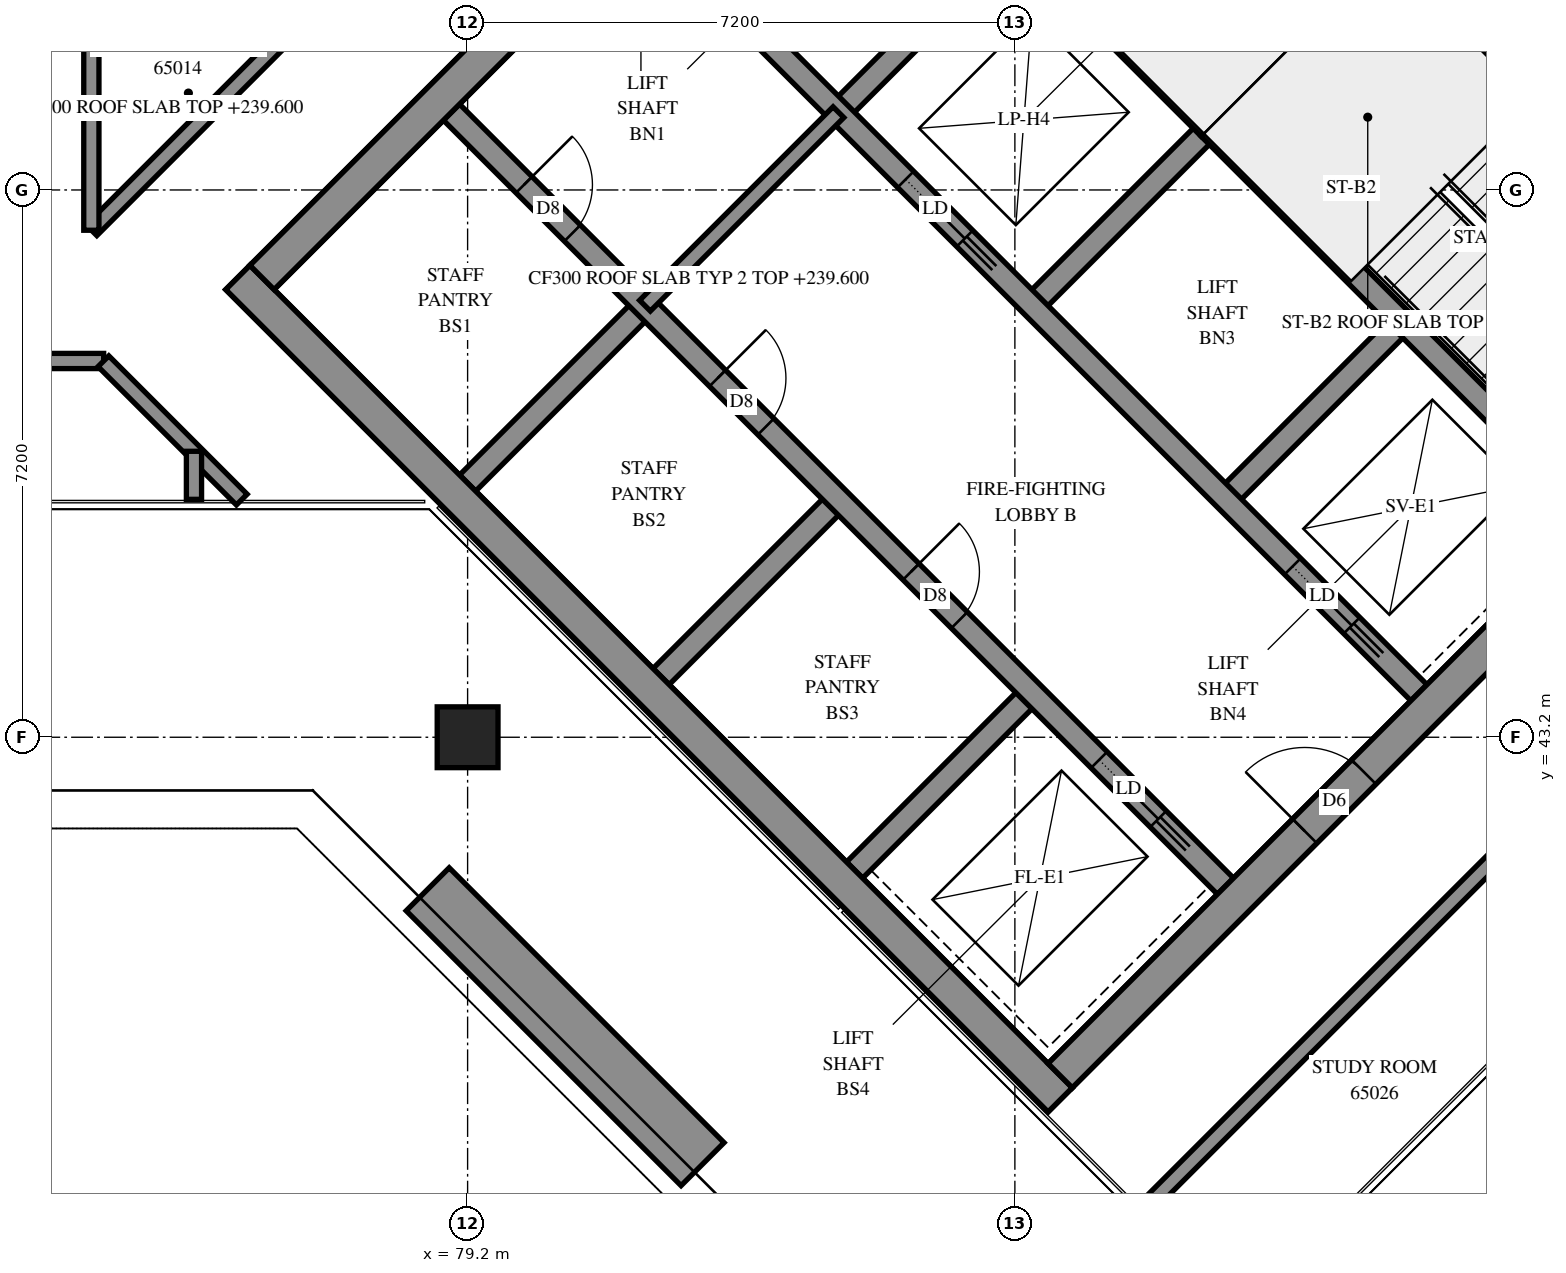
"""IFC4 building model, lengths in metres.
Left out: names, types, materials, properties, quantities, classifications, styles, units other than length and angle.
Written with IfcOpenShell. Run it as: python <this file> out.ifc"""

import sys

from ifc_helpers import new_model, si_unit, direction, frame, frame_2d, origin, origin_2d, place, context, subcontext, project, spatial, rectangle, extrude, element, fill, save


model = new_model("IFC4")
c1 = context("Model", 3, precision=1e-05, world=origin(), true_north=direction((0.0, 1.0)))
c2 = subcontext(c1, "Body", "Model", "MODEL_VIEW")
j1 = project(units=[si_unit("LENGTHUNIT", "METRE"), si_unit("PLANEANGLEUNIT", "RADIAN")], contexts=[c1])
p1 = place(None, origin())
s1 = spatial("IfcSite", under=j1, at=p1, CompositionType="ELEMENT")
p2 = place(p1, origin())
s2 = spatial("IfcBuilding", under=s1, at=p2, CompositionType="ELEMENT")
p3 = place(p2, frame((0.0, 0.0, 239.6)))
s3 = spatial("IfcBuildingStorey", under=s2, at=p3, CompositionType="ELEMENT", Elevation=239.6)
p4 = place(p3, frame((79.2, 43.2, 0.0), z_axis=(0.0, 0.0, 1.0), x_axis=(1.0, 0.0, 0.0)))
e1 = element("IfcColumn", 1, at=p4, inside=s3, PredefinedType="COLUMN", context=c2, shape_type="SweptSolid", body=[
    extrude(rectangle(XDim=0.8, YDim=0.8, at=origin_2d()), origin(), (0.0, 0.0, 1.0), 3.9),
])
p5 = place(p3, frame((76.177, 49.249, -0.3), z_axis=(0.0, 0.0, 1.0), x_axis=(0.7071100491, -0.7071035132, 0.0)))
e2 = element("IfcWall", 2, at=p5, inside=s3, PredefinedType="SHEAR", context=c2, shape_type="SweptSolid", body=[
    extrude(rectangle(XDim=15.3, YDim=0.45, at=frame_2d((7.65, 0.0))), origin(), (0.0, 0.0, 1.0), 3.5),
])
p6 = place(p3, frame((86.678, 59.749, -0.3), z_axis=(0.0, 0.0, 1.0), x_axis=(0.7071035132, -0.7071100491, 0.0)))
e3 = element("IfcWall", 3, at=p6, inside=s3, PredefinedType="SHEAR", context=c2, shape_type="SweptSolid", body=[
    extrude(rectangle(XDim=15.3, YDim=0.45, at=frame_2d((7.65, 0.0))), origin(), (0.0, 0.0, 1.0), 3.5),
])
p7 = place(p6, frame((10.45, 0.0, 0.3)))
e4 = element("IfcOpeningElement", 4, at=p7, cuts=e3, PredefinedType="OPENING", context=c2, shape_type="SweptSolid", body=[
    extrude(rectangle(XDim=0.8, YDim=2.1, at=frame_2d((0.4, 1.05))), frame((0.0, 0.235, 0.0), z_axis=(0.0, -1.0, 0.0), x_axis=(1.0, 0.0, 0.0)), (0.0, 0.0, 1.0), 0.47),
])
p8 = place(p3, frame((76.495, 49.249, -0.3), z_axis=(0.0, 0.0, 1.0), x_axis=(0.7071067812, 0.7071067812, 0.0)))
e5 = element("IfcWall", 5, at=p8, inside=s3, PredefinedType="SHEAR", context=c2, shape_type="SweptSolid", body=[
    extrude(rectangle(XDim=14.4, YDim=0.45, at=frame_2d((7.2, 0.0))), origin(), (0.0, 0.0, 1.0), 3.5),
])
p9 = place(p8, frame((4.55, 0.0, 0.3)))
e6 = element("IfcOpeningElement", 6, at=p9, cuts=e5, PredefinedType="OPENING", context=c2, shape_type="SweptSolid", body=[
    extrude(rectangle(XDim=1.1, YDim=2.1, at=frame_2d((0.55, 1.05))), frame((0.0, 0.235, 0.0), z_axis=(0.0, -1.0, 0.0), x_axis=(1.0, 0.0, 0.0)), (0.0, 0.0, 1.0), 0.47),
])
p10 = place(p8, frame((11.35, 0.0, 0.3)))
e7 = element("IfcOpeningElement", 7, at=p10, cuts=e5, PredefinedType="OPENING", context=c2, shape_type="SweptSolid", body=[
    extrude(rectangle(XDim=1.1, YDim=2.1, at=frame_2d((0.55, 1.05))), frame((0.0, 0.235, 0.0), z_axis=(0.0, -1.0, 0.0), x_axis=(1.0, 0.0, 0.0)), (0.0, 0.0, 1.0), 0.47),
])
p11 = place(p3, frame((86.996, 38.748, -0.3), z_axis=(0.0, 0.0, 1.0), x_axis=(0.7071067812, 0.7071067812, 0.0)))
e8 = element("IfcWall", 8, at=p11, inside=s3, PredefinedType="SHEAR", context=c2, shape_type="SweptSolid", body=[
    extrude(rectangle(XDim=14.4, YDim=0.45, at=frame_2d((7.2, 0.0))), origin(), (0.0, 0.0, 1.0), 3.5),
])
p12 = place(p11, frame((4.55, 0.0, 0.3)))
e9 = element("IfcOpeningElement", 9, at=p12, cuts=e8, PredefinedType="OPENING", context=c2, shape_type="SweptSolid", body=[
    extrude(rectangle(XDim=1.1, YDim=2.1, at=frame_2d((0.55, 1.05))), frame((0.0, 0.235, 0.0), z_axis=(0.0, -1.0, 0.0), x_axis=(1.0, 0.0, 0.0)), (0.0, 0.0, 1.0), 0.47),
])
p13 = place(p11, frame((11.35, 0.0, 0.3)))
e10 = element("IfcOpeningElement", 10, at=p13, cuts=e8, PredefinedType="OPENING", context=c2, shape_type="SweptSolid", body=[
    extrude(rectangle(XDim=1.1, YDim=2.1, at=frame_2d((0.55, 1.05))), frame((0.0, 0.235, 0.0), z_axis=(0.0, -1.0, 0.0), x_axis=(1.0, 0.0, 0.0)), (0.0, 0.0, 1.0), 0.47),
])
for number, where, z_axis, x_axis in (
    (11, (79.2, 46.544, 0.0), (0.0, 0.0, 1.0), (0.707, 0.707, 0.0)),
    (12, (84.079, 51.423, 0.0), (0.0, 0.0, 1.0), (0.707, 0.707, 0.0)),
):
    element("IfcWall", number, at=place(p3, frame(where, z_axis=z_axis, x_axis=x_axis)), inside=s3, PredefinedType="SOLIDWALL", context=c2, shape_type="SweptSolid", body=[
        extrude(rectangle(XDim=3.3, YDim=0.3, at=frame_2d((1.65, 0.0))), origin(), (0.0, 0.0, 1.0), 3.9),
    ])
p14 = place(p3, frame((81.746, 43.999, 0.0), z_axis=(0.0, 0.0, 1.0), x_axis=(0.7071067812, 0.7071067812, 0.0)))
e13 = element("IfcWall", 13, at=p14, inside=s3, PredefinedType="SOLIDWALL", context=c2, shape_type="SweptSolid", body=[
    extrude(rectangle(XDim=3.3, YDim=0.3, at=frame_2d((1.65, 0.0))), origin(), (0.0, 0.0, 1.0), 3.9),
])
p15 = place(p3, frame((86.625, 48.878, 0.0), z_axis=(0.0, 0.0, 1.0), x_axis=(0.7071067812, 0.7071067812, 0.0)))
e14 = element("IfcWall", 14, at=p15, inside=s3, PredefinedType="SOLIDWALL", context=c2, shape_type="SweptSolid", body=[
    extrude(rectangle(XDim=3.3, YDim=0.3, at=frame_2d((1.65, 0.0))), origin(), (0.0, 0.0, 1.0), 3.9),
])
p16 = place(p3, frame((84.291, 41.453, 0.0), z_axis=(0.0, 0.0, 1.0), x_axis=(0.7071067812, 0.7071067812, 0.0)))
e15 = element("IfcWall", 15, at=p16, inside=s3, PredefinedType="SOLIDWALL", context=c2, shape_type="SweptSolid", body=[
    extrude(rectangle(XDim=3.3, YDim=0.3, at=frame_2d((1.65, 0.0))), origin(), (0.0, 0.0, 1.0), 3.9),
])
p17 = place(p3, frame((89.17, 46.332, 0.0), z_axis=(0.0, 0.0, 1.0), x_axis=(0.7071067812, 0.7071067812, 0.0)))
e16 = element("IfcWall", 16, at=p17, inside=s3, PredefinedType="SOLIDWALL", context=c2, shape_type="SweptSolid", body=[
    extrude(rectangle(XDim=3.3, YDim=0.3, at=frame_2d((1.65, 0.0))), origin(), (0.0, 0.0, 1.0), 3.9),
])
p18 = place(p3, frame((78.988, 51.423, 0.0), z_axis=(0.0, 0.0, 1.0), x_axis=(0.7071067812, -0.7071067812, 0.0)))
e17 = element("IfcWall", 17, at=p18, inside=s3, PredefinedType="SOLIDWALL", context=c2, shape_type="SweptSolid", body=[
    extrude(rectangle(XDim=14.4, YDim=0.3, at=frame_2d((7.2, 0.0))), origin(), (0.0, 0.0, 1.0), 3.9),
])
p19 = place(p18, frame((1.35, 0.0, 0.0)))
e18 = element("IfcOpeningElement", 18, at=p19, cuts=e17, PredefinedType="OPENING", context=c2, shape_type="SweptSolid", body=[
    extrude(rectangle(XDim=0.9, YDim=2.1, at=frame_2d((0.45, 1.05))), frame((0.0, 0.16, 0.0), z_axis=(0.0, -1.0, 0.0), x_axis=(1.0, 0.0, 0.0)), (0.0, 0.0, 1.0), 0.32),
])
p20 = place(p18, frame((4.95, 0.0, 0.0)))
e19 = element("IfcOpeningElement", 19, at=p20, cuts=e17, PredefinedType="OPENING", context=c2, shape_type="SweptSolid", body=[
    extrude(rectangle(XDim=0.9, YDim=2.1, at=frame_2d((0.45, 1.05))), frame((0.0, 0.16, 0.0), z_axis=(0.0, -1.0, 0.0), x_axis=(1.0, 0.0, 0.0)), (0.0, 0.0, 1.0), 0.32),
])
p21 = place(p18, frame((8.55, 0.0, 0.0)))
e20 = element("IfcOpeningElement", 20, at=p21, cuts=e17, PredefinedType="OPENING", context=c2, shape_type="SweptSolid", body=[
    extrude(rectangle(XDim=0.9, YDim=2.1, at=frame_2d((0.45, 1.05))), frame((0.0, 0.16, 0.0), z_axis=(0.0, -1.0, 0.0), x_axis=(1.0, 0.0, 0.0)), (0.0, 0.0, 1.0), 0.32),
])
p22 = place(p18, frame((12.05, 0.0, 0.0)))
e21 = element("IfcOpeningElement", 21, at=p22, cuts=e17, PredefinedType="OPENING", context=c2, shape_type="SweptSolid", body=[
    extrude(rectangle(XDim=1.1, YDim=2.1, at=frame_2d((0.55, 1.05))), frame((0.0, 0.16, 0.0), z_axis=(0.0, -1.0, 0.0), x_axis=(1.0, 0.0, 0.0)), (0.0, 0.0, 1.0), 0.32),
])
p23 = place(p3, frame((81.534, 53.969, 0.0), z_axis=(0.0, 0.0, 1.0), x_axis=(0.707103309, -0.7071102534, 0.0)))
e22 = element("IfcWall", 22, at=p23, inside=s3, PredefinedType="SOLIDWALL", context=c2, shape_type="SweptSolid", body=[
    extrude(rectangle(XDim=14.4, YDim=0.3, at=frame_2d((7.2, 0.0))), origin(), (0.0, 0.0, 1.0), 3.9),
])
p24 = place(p23, frame((1.25, 0.0, 0.0)))
e23 = element("IfcOpeningElement", 23, at=p24, cuts=e22, PredefinedType="OPENING", context=c2, shape_type="SweptSolid", body=[
    extrude(rectangle(XDim=1.1, YDim=2.1, at=frame_2d((0.55, 1.05))), frame((0.0, 0.16, 0.0), z_axis=(0.0, -1.0, 0.0), x_axis=(1.0, 0.0, 0.0)), (0.0, 0.0, 1.0), 0.32),
])
p25 = place(p23, frame((4.85, 0.0, 0.0)))
e24 = element("IfcOpeningElement", 24, at=p25, cuts=e22, PredefinedType="OPENING", context=c2, shape_type="SweptSolid", body=[
    extrude(rectangle(XDim=1.1, YDim=2.1, at=frame_2d((0.55, 1.05))), frame((0.0, 0.16, 0.0), z_axis=(0.0, -1.0, 0.0), x_axis=(1.0, 0.0, 0.0)), (0.0, 0.0, 1.0), 0.32),
])
p26 = place(p23, frame((12.05, 0.0, 0.0)))
e25 = element("IfcOpeningElement", 25, at=p26, cuts=e22, PredefinedType="OPENING", context=c2, shape_type="SweptSolid", body=[
    extrude(rectangle(XDim=1.1, YDim=2.1, at=frame_2d((0.55, 1.05))), frame((0.0, 0.16, 0.0), z_axis=(0.0, -1.0, 0.0), x_axis=(1.0, 0.0, 0.0)), (0.0, 0.0, 1.0), 0.32),
])
for number, where, z_axis, x_axis in (
    (26, (83.867, 56.302, 0.0), (0.0, 0.0, 1.0), (0.707, -0.707, 0.0)),
    (27, (88.958, 51.211, 0.0), (0.0, 0.0, 1.0), (0.707, -0.707, 0.0)),
):
    element("IfcWall", number, at=place(p3, frame(where, z_axis=z_axis, x_axis=x_axis)), inside=s3, PredefinedType="SOLIDWALL", context=c2, shape_type="SweptSolid", body=[
        extrude(rectangle(XDim=7.2, YDim=0.3, at=frame_2d((3.6, 0.0))), origin(), (0.0, 0.0, 1.0), 3.9),
    ])
p27 = place(p3, frame((88.958, 51.211, 0.0), z_axis=(0.0, 0.0, 1.0), x_axis=(0.7071067812, 0.7071067812, 0.0)))
e28 = element("IfcWall", 28, at=p27, inside=s3, PredefinedType="SOLIDWALL", context=c2, shape_type="SweptSolid", body=[
    extrude(rectangle(XDim=4.2, YDim=0.3, at=frame_2d((2.1, 0.0))), origin(), (0.0, 0.0, 1.0), 3.9),
])
p28 = place(p3, frame((78.675, 41.2, 0.0), z_axis=(0.0, 0.0, 1.0), x_axis=(0.7071067812, -0.7071067812, 0.0)))
e29 = element("IfcWall", 29, at=p28, inside=s3, PredefinedType="SOLIDWALL", context=c2, shape_type="SweptSolid", body=[
    extrude(rectangle(XDim=5.114, YDim=0.8, at=frame_2d((2.557, 0.0))), origin(), (0.0, 0.0, 1.0), 0.65),
])
p29 = place(p3, frame((91.313, 53.354, 0.0), z_axis=(0.0, 0.0, 1.0), x_axis=(0.7071067812, -0.7071067812, 0.0)))
e30 = element("IfcWall", 30, at=p29, inside=s3, PredefinedType="PARTITIONING", context=c2, shape_type="SweptSolid", body=[
    extrude(rectangle(XDim=5.95, YDim=0.15, at=frame_2d((2.975, 0.0))), origin(), (0.0, 0.0, 1.0), 3.9),
])
p30 = place(p3, frame((81.534, 48.878, 0.0), z_axis=(0.0, 0.0, 1.0), x_axis=(0.707092892, 0.7071206701, 0.0)))
e31 = element("IfcWall", 31, at=p30, inside=s3, PredefinedType="PARTITIONING", context=c2, shape_type="SweptSolid", body=[
    extrude(rectangle(XDim=3.6, YDim=0.2, at=frame_2d((1.8, 0.0))), origin(), (0.0, 0.0, 1.0), 3.9),
])
p31 = place(p3, frame((55.352, 48.15, 0.0), z_axis=(0.0, 0.0, 1.0), x_axis=(1.0, 0.0, 0.0)))
e32 = element("IfcWall", 32, at=p31, inside=s3, PredefinedType="PARTITIONING", context=c2, shape_type="SweptSolid", body=[
    extrude(rectangle(XDim=19.06, YDim=0.2, at=frame_2d((9.53, 0.0))), origin(), (0.0, 0.0, 1.0), 3.9),
])
p32 = place(p31, frame((11.608, 0.0, 0.0)))
e33 = element("IfcOpeningElement", 33, at=p32, cuts=e32, PredefinedType="OPENING", context=c2, shape_type="SweptSolid", body=[
    extrude(rectangle(XDim=1.0, YDim=2.1, at=frame_2d((0.5, 1.05))), frame((0.0, 0.11, 0.0), z_axis=(0.0, -1.0, 0.0), x_axis=(1.0, 0.0, 0.0)), (0.0, 0.0, 1.0), 0.22),
])
p33 = place(p3, frame((88.094, 36.984, 0.0), z_axis=(0.0, 0.0, 1.0), x_axis=(0.7071067812, 0.7071067812, 0.0)))
e34 = element("IfcWall", 34, at=p33, inside=s3, PredefinedType="PARTITIONING", context=c2, shape_type="SweptSolid", body=[
    extrude(rectangle(XDim=6.771, YDim=0.2, at=frame_2d((3.386, 0.0))), origin(), (0.0, 0.0, 1.0), 3.9),
])
p34 = place(p3, frame((74.251, 49.87, 0.0), z_axis=(0.0, 0.0, 1.0), x_axis=(0.7071067812, 0.7071067812, 0.0)))
e35 = element("IfcWall", 35, at=p34, inside=s3, PredefinedType="PARTITIONING", context=c2, shape_type="SweptSolid", body=[
    extrude(rectangle(XDim=4.565, YDim=0.2, at=frame_2d((2.283, 0.0))), origin(), (0.0, 0.0, 1.0), 3.9),
])
p35 = place(p3, frame((74.25, 49.87, 0.0), z_axis=(0.0, 0.0, 1.0), x_axis=(0.0, 1.0, 0.0)))
e36 = element("IfcWall", 36, at=p35, inside=s3, PredefinedType="PARTITIONING", context=c2, shape_type="SweptSolid", body=[
    extrude(rectangle(XDim=3.23, YDim=0.2, at=frame_2d((1.615, 0.0))), origin(), (0.0, 0.0, 1.0), 3.9),
])
p36 = place(p3, frame((74.409, 48.147, 0.0), z_axis=(0.0, 0.0, 1.0), x_axis=(0.7071067812, -0.7071067812, 0.0)))
e37 = element("IfcWall", 37, at=p36, inside=s3, PredefinedType="PARTITIONING", context=c2, shape_type="SweptSolid", body=[
    extrude(rectangle(XDim=2.574, YDim=0.2, at=frame_2d((1.287, 0.0))), origin(), (0.0, 0.0, 1.0), 3.9),
])
p37 = place(p3, frame((75.6, 46.33, 0.0), z_axis=(0.0, 0.0, 1.0), x_axis=(0.0, 1.0, 0.0)))
e38 = element("IfcWall", 38, at=p37, inside=s3, PredefinedType="PARTITIONING", context=c2, shape_type="SweptSolid", body=[
    extrude(rectangle(XDim=0.632, YDim=0.2, at=frame_2d((0.316, 0.0))), origin(), (0.0, 0.0, 1.0), 3.9),
])
p38 = place(p12, origin())
e39 = element("IfcDoor", 39, at=p38, inside=s3, OperationType="DOUBLE_DOOR_SINGLE_SWING", PredefinedType="DOOR", context=c2, shape_type="SweptSolid", body=[
    extrude(rectangle(XDim=1.1, YDim=2.1, at=frame_2d((0.55, 1.05))), frame((0.0, 0.025, 0.0), z_axis=(0.0, -1.0, 0.0), x_axis=(1.0, 0.0, 0.0)), (0.0, 0.0, 1.0), 0.05),
])
fill(e9, e39)
p39 = place(p19, origin())
e40 = element("IfcDoor", 40, at=p39, inside=s3, OperationType="SINGLE_SWING_LEFT", PredefinedType="DOOR", context=c2, shape_type="SweptSolid", body=[
    extrude(rectangle(XDim=0.9, YDim=2.1, at=frame_2d((0.45, 1.05))), frame((0.0, 0.025, 0.0), z_axis=(0.0, -1.0, 0.0), x_axis=(1.0, 0.0, 0.0)), (0.0, 0.0, 1.0), 0.05),
])
fill(e18, e40)
p40 = place(p20, origin())
e41 = element("IfcDoor", 41, at=p40, inside=s3, OperationType="SINGLE_SWING_LEFT", PredefinedType="DOOR", context=c2, shape_type="SweptSolid", body=[
    extrude(rectangle(XDim=0.9, YDim=2.1, at=frame_2d((0.45, 1.05))), frame((0.0, 0.025, 0.0), z_axis=(0.0, -1.0, 0.0), x_axis=(1.0, 0.0, 0.0)), (0.0, 0.0, 1.0), 0.05),
])
fill(e19, e41)
p41 = place(p21, origin())
e42 = element("IfcDoor", 42, at=p41, inside=s3, OperationType="SINGLE_SWING_LEFT", PredefinedType="DOOR", context=c2, shape_type="SweptSolid", body=[
    extrude(rectangle(XDim=0.9, YDim=2.1, at=frame_2d((0.45, 1.05))), frame((0.0, 0.025, 0.0), z_axis=(0.0, -1.0, 0.0), x_axis=(1.0, 0.0, 0.0)), (0.0, 0.0, 1.0), 0.05),
])
fill(e20, e42)
p42 = place(p22, origin())
e43 = element("IfcDoor", 43, at=p42, inside=s3, OperationType="SLIDING_TO_RIGHT", PredefinedType="DOOR", context=c2, shape_type="SweptSolid", body=[
    extrude(rectangle(XDim=1.1, YDim=2.1, at=frame_2d((0.55, 1.05))), frame((0.0, 0.025, 0.0), z_axis=(0.0, -1.0, 0.0), x_axis=(1.0, 0.0, 0.0)), (0.0, 0.0, 1.0), 0.05),
])
fill(e21, e43)
p43 = place(p25, origin())
e44 = element("IfcDoor", 44, at=p43, inside=s3, OperationType="SLIDING_TO_RIGHT", PredefinedType="DOOR", context=c2, shape_type="SweptSolid", body=[
    extrude(rectangle(XDim=1.1, YDim=2.1, at=frame_2d((0.55, 1.05))), frame((0.0, 0.025, 0.0), z_axis=(0.0, -1.0, 0.0), x_axis=(1.0, 0.0, 0.0)), (0.0, 0.0, 1.0), 0.05),
])
fill(e24, e44)
p44 = place(p26, origin())
e45 = element("IfcDoor", 45, at=p44, inside=s3, OperationType="SLIDING_TO_RIGHT", PredefinedType="DOOR", context=c2, shape_type="SweptSolid", body=[
    extrude(rectangle(XDim=1.1, YDim=2.1, at=frame_2d((0.55, 1.05))), frame((0.0, 0.025, 0.0), z_axis=(0.0, -1.0, 0.0), x_axis=(1.0, 0.0, 0.0)), (0.0, 0.0, 1.0), 0.05),
])
fill(e25, e45)
save(model, sys.argv[1])
